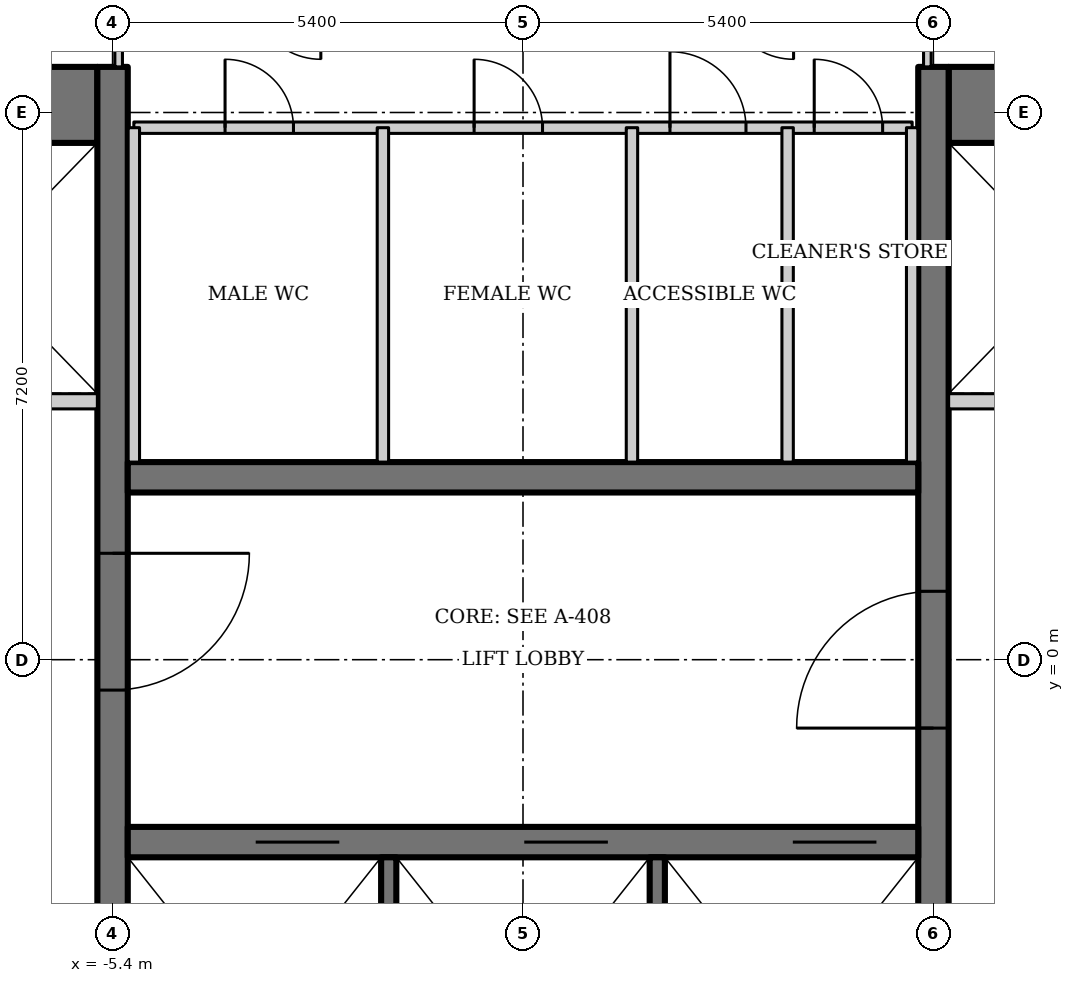
"""IFC4 building model, lengths in metres.
Left out: names, types, materials, properties, quantities, classifications, styles, units other than length and angle.
Written with IfcOpenShell. Run it as: python <this file> out.ifc"""

import sys

from ifc_helpers import new_model, si_unit, direction, frame, frame_2d, origin, place, context, subcontext, project, spatial, rectangle, extrude, element, fill, save


model = new_model("IFC4")
c1 = context("Model", 3, precision=1e-05, world=origin(), true_north=direction((0.0, 1.0)))
c2 = subcontext(c1, "Body", "Model", "MODEL_VIEW")
j1 = project(units=[si_unit("LENGTHUNIT", "METRE"), si_unit("PLANEANGLEUNIT", "RADIAN")], contexts=[c1])
p1 = place(None, origin())
s1 = spatial("IfcSite", under=j1, at=p1, CompositionType="ELEMENT")
p2 = place(p1, origin())
s2 = spatial("IfcBuilding", under=s1, at=p2, CompositionType="ELEMENT")
p3 = place(p2, frame((0.0, 0.0, 220.0)))
s3 = spatial("IfcBuildingStorey", under=s2, at=p3, CompositionType="ELEMENT", Elevation=220.0)
for number, where, z_axis, x_axis in (
    (1, (12.2, 7.3, 0.0), (0.0, 0.0, 1.0), (-1.0, 0.0, 0.0)),
    (2, (-5.6, 7.3, 0.0), (0.0, 0.0, 1.0), (-1.0, 0.0, 0.0)),
):
    element("IfcWall", number, at=place(p3, frame(where, z_axis=z_axis, x_axis=x_axis)), inside=s3, PredefinedType="SHEAR", context=c2, shape_type="SweptSolid", body=[
        extrude(rectangle(XDim=6.6, YDim=1.0, at=frame_2d((3.3, 0.0))), origin(), (0.0, 0.0, 1.0), 4.2),
    ])
p4 = place(p3, frame((5.4, -6.8, 0.0), z_axis=(0.0, 0.0, 1.0), x_axis=(0.0, 1.0, 0.0)))
e3 = element("IfcWall", 3, at=p4, inside=s3, PredefinedType="SHEAR", context=c2, shape_type="SweptSolid", body=[
    extrude(rectangle(XDim=14.6, YDim=0.4, at=frame_2d((7.3, 0.0))), origin(), (0.0, 0.0, 1.0), 4.2),
])
p5 = place(p4, frame((5.9, 0.0, 0.0)))
e4 = element("IfcOpeningElement", 4, at=p5, cuts=e3, PredefinedType="OPENING", context=c2, shape_type="SweptSolid", body=[
    extrude(rectangle(XDim=1.8, YDim=2.1, at=frame_2d((0.9, 1.05))), frame((0.0, 0.21, 0.0), z_axis=(0.0, -1.0, 0.0), x_axis=(1.0, 0.0, 0.0)), (0.0, 0.0, 1.0), 0.42),
])
p6 = place(p3, frame((-5.4, 7.8, 0.0), z_axis=(0.0, 0.0, 1.0), x_axis=(0.0, -1.0, 0.0)))
e5 = element("IfcWall", 5, at=p6, inside=s3, PredefinedType="SHEAR", context=c2, shape_type="SweptSolid", body=[
    extrude(rectangle(XDim=14.6, YDim=0.4, at=frame_2d((7.3, 0.0))), origin(), (0.0, 0.0, 1.0), 4.2),
])
p7 = place(p6, frame((6.4, 0.0, 0.0)))
e6 = element("IfcOpeningElement", 6, at=p7, cuts=e5, PredefinedType="OPENING", context=c2, shape_type="SweptSolid", body=[
    extrude(rectangle(XDim=1.8, YDim=2.1, at=frame_2d((0.9, 1.05))), frame((0.0, 0.21, 0.0), z_axis=(0.0, -1.0, 0.0), x_axis=(1.0, 0.0, 0.0)), (0.0, 0.0, 1.0), 0.42),
])
p8 = place(p3, frame((-5.2, -2.4, 0.0), z_axis=(0.0, 0.0, 1.0), x_axis=(1.0, 0.0, 0.0)))
e7 = element("IfcWall", 7, at=p8, inside=s3, PredefinedType="SHEAR", context=c2, shape_type="SweptSolid", body=[
    extrude(rectangle(XDim=10.4, YDim=0.4, at=frame_2d((5.2, 0.0))), origin(), (0.0, 0.0, 1.0), 4.2),
])
p9 = place(p8, frame((1.683, 0.0, 0.0)))
e8 = element("IfcOpeningElement", 8, at=p9, cuts=e7, PredefinedType="OPENING", context=c2, shape_type="SweptSolid", body=[
    extrude(rectangle(XDim=1.1, YDim=2.2, at=frame_2d((0.55, 1.1))), frame((0.0, 0.21, 0.0), z_axis=(0.0, -1.0, 0.0), x_axis=(1.0, 0.0, 0.0)), (0.0, 0.0, 1.0), 0.42),
])
p10 = place(p8, frame((5.217, 0.0, 0.0)))
e9 = element("IfcOpeningElement", 9, at=p10, cuts=e7, PredefinedType="OPENING", context=c2, shape_type="SweptSolid", body=[
    extrude(rectangle(XDim=1.1, YDim=2.2, at=frame_2d((0.55, 1.1))), frame((0.0, 0.21, 0.0), z_axis=(0.0, -1.0, 0.0), x_axis=(1.0, 0.0, 0.0)), (0.0, 0.0, 1.0), 0.42),
])
p11 = place(p8, frame((8.75, 0.0, 0.0)))
e10 = element("IfcOpeningElement", 10, at=p11, cuts=e7, PredefinedType="OPENING", context=c2, shape_type="SweptSolid", body=[
    extrude(rectangle(XDim=1.1, YDim=2.2, at=frame_2d((0.55, 1.1))), frame((0.0, 0.21, 0.0), z_axis=(0.0, -1.0, 0.0), x_axis=(1.0, 0.0, 0.0)), (0.0, 0.0, 1.0), 0.42),
])
for number, where, z_axis, x_axis in (
    (11, (-1.767, -2.6, 0.0), (0.0, 0.0, 1.0), (0.0, -1.0, 0.0)),
    (12, (1.767, -2.6, 0.0), (0.0, 0.0, 1.0), (0.0, -1.0, 0.0)),
):
    element("IfcWall", number, at=place(p3, frame(where, z_axis=z_axis, x_axis=x_axis)), inside=s3, PredefinedType="SOLIDWALL", context=c2, shape_type="SweptSolid", body=[
        extrude(rectangle(XDim=4.2, YDim=0.2, at=frame_2d((2.1, 0.0))), origin(), (0.0, 0.0, 1.0), 4.2),
    ])
p12 = place(p3, frame((5.2, 2.4, 0.0), z_axis=(0.0, 0.0, 1.0), x_axis=(-1.0, 0.0, 0.0)))
e13 = element("IfcWall", 13, at=p12, inside=s3, PredefinedType="SHEAR", context=c2, shape_type="SweptSolid", body=[
    extrude(rectangle(XDim=10.4, YDim=0.4, at=frame_2d((5.2, 0.0))), origin(), (0.0, 0.0, 1.0), 4.2),
])
p13 = place(p3, frame((12.2, 3.4, 0.0), z_axis=(0.0, 0.0, 1.0), x_axis=(-1.0, 0.0, 0.0)))
e14 = element("IfcWall", 14, at=p13, inside=s3, PredefinedType="SOLIDWALL", context=c2, shape_type="SweptSolid", body=[
    extrude(rectangle(XDim=6.6, YDim=0.2, at=frame_2d((3.3, 0.0))), origin(), (0.0, 0.0, 1.0), 4.2),
])
p14 = place(p13, frame((4.45, 0.0, 0.0)))
e15 = element("IfcOpeningElement", 15, at=p14, cuts=e14, PredefinedType="OPENING", context=c2, shape_type="SweptSolid", body=[
    extrude(rectangle(XDim=1.1, YDim=2.2, at=frame_2d((0.55, 1.1))), frame((0.0, 0.11, 0.0), z_axis=(0.0, -1.0, 0.0), x_axis=(1.0, 0.0, 0.0)), (0.0, 0.0, 1.0), 0.22),
])
p15 = place(p13, frame((0.9, 0.0, 0.0)))
e16 = element("IfcOpeningElement", 16, at=p15, cuts=e14, PredefinedType="OPENING", context=c2, shape_type="SweptSolid", body=[
    extrude(rectangle(XDim=1.4, YDim=2.2, at=frame_2d((0.7, 1.1))), frame((0.0, 0.11, 0.0), z_axis=(0.0, -1.0, 0.0), x_axis=(1.0, 0.0, 0.0)), (0.0, 0.0, 1.0), 0.22),
])
p16 = place(p3, frame((-12.2, 3.4, 0.0), z_axis=(0.0, 0.0, 1.0), x_axis=(1.0, 0.0, 0.0)))
e17 = element("IfcWall", 17, at=p16, inside=s3, PredefinedType="SOLIDWALL", context=c2, shape_type="SweptSolid", body=[
    extrude(rectangle(XDim=6.6, YDim=0.2, at=frame_2d((3.3, 0.0))), origin(), (0.0, 0.0, 1.0), 4.2),
])
p17 = place(p16, frame((1.05, 0.0, 0.0)))
e18 = element("IfcOpeningElement", 18, at=p17, cuts=e17, PredefinedType="OPENING", context=c2, shape_type="SweptSolid", body=[
    extrude(rectangle(XDim=1.1, YDim=2.2, at=frame_2d((0.55, 1.1))), frame((0.0, 0.11, 0.0), z_axis=(0.0, -1.0, 0.0), x_axis=(1.0, 0.0, 0.0)), (0.0, 0.0, 1.0), 0.22),
])
p18 = place(p16, frame((4.3, 0.0, 0.0)))
e19 = element("IfcOpeningElement", 19, at=p18, cuts=e17, PredefinedType="OPENING", context=c2, shape_type="SweptSolid", body=[
    extrude(rectangle(XDim=1.4, YDim=2.2, at=frame_2d((0.7, 1.1))), frame((0.0, 0.11, 0.0), z_axis=(0.0, -1.0, 0.0), x_axis=(1.0, 0.0, 0.0)), (0.0, 0.0, 1.0), 0.22),
])
p19 = place(p3, frame((-5.12, 7.0, 0.0), z_axis=(0.0, 0.0, 1.0), x_axis=(1.0, 0.0, 0.0)))
e20 = element("IfcWall", 20, at=p19, inside=s3, PredefinedType="SOLIDWALL", context=c2, shape_type="SweptSolid", body=[
    extrude(rectangle(XDim=10.24, YDim=0.15, at=frame_2d((5.12, 0.0))), origin(), (0.0, 0.0, 1.0), 4.05),
])
p20 = place(p19, frame((1.2, 0.0, 0.0)))
e21 = element("IfcOpeningElement", 21, at=p20, cuts=e20, PredefinedType="OPENING", context=c2, shape_type="SweptSolid", body=[
    extrude(rectangle(XDim=0.9, YDim=2.1, at=frame_2d((0.45, 1.05))), frame((0.0, 0.085, 0.0), z_axis=(0.0, -1.0, 0.0), x_axis=(1.0, 0.0, 0.0)), (0.0, 0.0, 1.0), 0.17),
])
p21 = place(p19, frame((4.477, 0.0, 0.0)))
e22 = element("IfcOpeningElement", 22, at=p21, cuts=e20, PredefinedType="OPENING", context=c2, shape_type="SweptSolid", body=[
    extrude(rectangle(XDim=0.9, YDim=2.1, at=frame_2d((0.45, 1.05))), frame((0.0, 0.085, 0.0), z_axis=(0.0, -1.0, 0.0), x_axis=(1.0, 0.0, 0.0)), (0.0, 0.0, 1.0), 0.17),
])
p22 = place(p19, frame((7.054, 0.0, 0.0)))
e23 = element("IfcOpeningElement", 23, at=p22, cuts=e20, PredefinedType="OPENING", context=c2, shape_type="SweptSolid", body=[
    extrude(rectangle(XDim=1.0, YDim=2.1, at=frame_2d((0.5, 1.05))), frame((0.0, 0.085, 0.0), z_axis=(0.0, -1.0, 0.0), x_axis=(1.0, 0.0, 0.0)), (0.0, 0.0, 1.0), 0.17),
])
p23 = place(p19, frame((8.952, 0.0, 0.0)))
e24 = element("IfcOpeningElement", 24, at=p23, cuts=e20, PredefinedType="OPENING", context=c2, shape_type="SweptSolid", body=[
    extrude(rectangle(XDim=0.9, YDim=2.1, at=frame_2d((0.45, 1.05))), frame((0.0, 0.085, 0.0), z_axis=(0.0, -1.0, 0.0), x_axis=(1.0, 0.0, 0.0)), (0.0, 0.0, 1.0), 0.17),
])
for number, where, z_axis, x_axis in (
    (25, (-5.12, 2.6, 0.0), (0.0, 0.0, 1.0), (0.0, 1.0, 0.0)),
    (26, (5.12, 2.6, 0.0), (0.0, 0.0, 1.0), (0.0, 1.0, 0.0)),
    (27, (-1.843, 2.6, 0.0), (0.0, 0.0, 1.0), (0.0, 1.0, 0.0)),
):
    element("IfcWall", number, at=place(p3, frame(where, z_axis=z_axis, x_axis=x_axis)), inside=s3, PredefinedType="SOLIDWALL", context=c2, shape_type="SweptSolid", body=[
        extrude(rectangle(XDim=4.4, YDim=0.15, at=frame_2d((2.2, 0.0))), origin(), (0.0, 0.0, 1.0), 4.05),
    ])
p24 = place(p3, frame((1.434, 2.6, 0.0), z_axis=(0.0, 0.0, 1.0), x_axis=(0.0, 1.0, 0.0)))
e28 = element("IfcWall", 28, at=p24, inside=s3, PredefinedType="SOLIDWALL", context=c2, shape_type="SweptSolid", body=[
    extrude(rectangle(XDim=4.4, YDim=0.15, at=frame_2d((2.2, 0.0))), origin(), (0.0, 0.0, 1.0), 3.108),
])
p25 = place(p3, frame((3.482, 2.6, 0.0), z_axis=(0.0, 0.0, 1.0), x_axis=(0.0, 1.0, 0.0)))
e29 = element("IfcWall", 29, at=p25, inside=s3, PredefinedType="SOLIDWALL", context=c2, shape_type="SweptSolid", body=[
    extrude(rectangle(XDim=4.4, YDim=0.15, at=frame_2d((2.2, 0.0))), origin(), (0.0, 0.0, 1.0), 4.05),
])
for number, where, z_axis, x_axis in (
    (30, (5.32, 7.8, 0.0), (0.0, 0.0, 1.0), (0.0, 1.0, 0.0)),
    (31, (-5.32, 8.8, 0.0), (0.0, 0.0, 1.0), (0.0, -1.0, 0.0)),
):
    element("IfcWall", number, at=place(p3, frame(where, z_axis=z_axis, x_axis=x_axis)), inside=s3, PredefinedType="PARTITIONING", context=c2, shape_type="SweptSolid", body=[
        extrude(rectangle(XDim=1.0, YDim=0.1, at=frame_2d((0.5, 0.0))), origin(), (0.0, 0.0, 1.0), 4.05),
    ])
p26 = place(p5, origin())
e32 = element("IfcDoor", 32, at=p26, inside=s3, OperationType="DOUBLE_DOOR_DOUBLE_SWING", PredefinedType="DOOR", context=c2, shape_type="SweptSolid", body=[
    extrude(rectangle(XDim=1.8, YDim=2.1, at=frame_2d((0.9, 1.05))), frame((0.0, 0.025, 0.0), z_axis=(0.0, -1.0, 0.0), x_axis=(1.0, 0.0, 0.0)), (0.0, 0.0, 1.0), 0.05),
])
fill(e4, e32)
p27 = place(p7, origin())
e33 = element("IfcDoor", 33, at=p27, inside=s3, OperationType="DOUBLE_DOOR_DOUBLE_SWING", PredefinedType="DOOR", context=c2, shape_type="SweptSolid", body=[
    extrude(rectangle(XDim=1.8, YDim=2.1, at=frame_2d((0.9, 1.05))), frame((0.0, 0.025, 0.0), z_axis=(0.0, -1.0, 0.0), x_axis=(1.0, 0.0, 0.0)), (0.0, 0.0, 1.0), 0.05),
])
fill(e6, e33)
p28 = place(p9, origin())
e34 = element("IfcDoor", 34, at=p28, inside=s3, OperationType="DOUBLE_DOOR_SLIDING", PredefinedType="DOOR", context=c2, shape_type="SweptSolid", body=[
    extrude(rectangle(XDim=1.1, YDim=2.2, at=frame_2d((0.55, 1.1))), frame((0.0, 0.025, 0.0), z_axis=(0.0, -1.0, 0.0), x_axis=(1.0, 0.0, 0.0)), (0.0, 0.0, 1.0), 0.05),
])
fill(e8, e34)
p29 = place(p10, origin())
e35 = element("IfcDoor", 35, at=p29, inside=s3, OperationType="DOUBLE_DOOR_SLIDING", PredefinedType="DOOR", context=c2, shape_type="SweptSolid", body=[
    extrude(rectangle(XDim=1.1, YDim=2.2, at=frame_2d((0.55, 1.1))), frame((0.0, 0.025, 0.0), z_axis=(0.0, -1.0, 0.0), x_axis=(1.0, 0.0, 0.0)), (0.0, 0.0, 1.0), 0.05),
])
fill(e9, e35)
p30 = place(p11, origin())
e36 = element("IfcDoor", 36, at=p30, inside=s3, OperationType="DOUBLE_DOOR_SLIDING", PredefinedType="DOOR", context=c2, shape_type="SweptSolid", body=[
    extrude(rectangle(XDim=1.1, YDim=2.2, at=frame_2d((0.55, 1.1))), frame((0.0, 0.025, 0.0), z_axis=(0.0, -1.0, 0.0), x_axis=(1.0, 0.0, 0.0)), (0.0, 0.0, 1.0), 0.05),
])
fill(e10, e36)
p31 = place(p20, origin())
e37 = element("IfcDoor", 37, at=p31, inside=s3, OperationType="SINGLE_SWING_LEFT", PredefinedType="DOOR", context=c2, shape_type="SweptSolid", body=[
    extrude(rectangle(XDim=0.9, YDim=2.1, at=frame_2d((0.45, 1.05))), frame((0.0, 0.025, 0.0), z_axis=(0.0, -1.0, 0.0), x_axis=(1.0, 0.0, 0.0)), (0.0, 0.0, 1.0), 0.05),
])
fill(e21, e37)
p32 = place(p21, origin())
e38 = element("IfcDoor", 38, at=p32, inside=s3, OperationType="SINGLE_SWING_LEFT", PredefinedType="DOOR", context=c2, shape_type="SweptSolid", body=[
    extrude(rectangle(XDim=0.9, YDim=2.1, at=frame_2d((0.45, 1.05))), frame((0.0, 0.025, 0.0), z_axis=(0.0, -1.0, 0.0), x_axis=(1.0, 0.0, 0.0)), (0.0, 0.0, 1.0), 0.05),
])
fill(e22, e38)
p33 = place(p22, origin())
e39 = element("IfcDoor", 39, at=p33, inside=s3, OperationType="SINGLE_SWING_LEFT", PredefinedType="DOOR", context=c2, shape_type="SweptSolid", body=[
    extrude(rectangle(XDim=1.0, YDim=2.1, at=frame_2d((0.5, 1.05))), frame((0.0, 0.025, 0.0), z_axis=(0.0, -1.0, 0.0), x_axis=(1.0, 0.0, 0.0)), (0.0, 0.0, 1.0), 0.05),
])
fill(e23, e39)
p34 = place(p23, origin())
e40 = element("IfcDoor", 40, at=p34, inside=s3, OperationType="SINGLE_SWING_LEFT", PredefinedType="DOOR", context=c2, shape_type="SweptSolid", body=[
    extrude(rectangle(XDim=0.9, YDim=2.1, at=frame_2d((0.45, 1.05))), frame((0.0, 0.025, 0.0), z_axis=(0.0, -1.0, 0.0), x_axis=(1.0, 0.0, 0.0)), (0.0, 0.0, 1.0), 0.05),
])
fill(e24, e40)
save(model, sys.argv[1])
